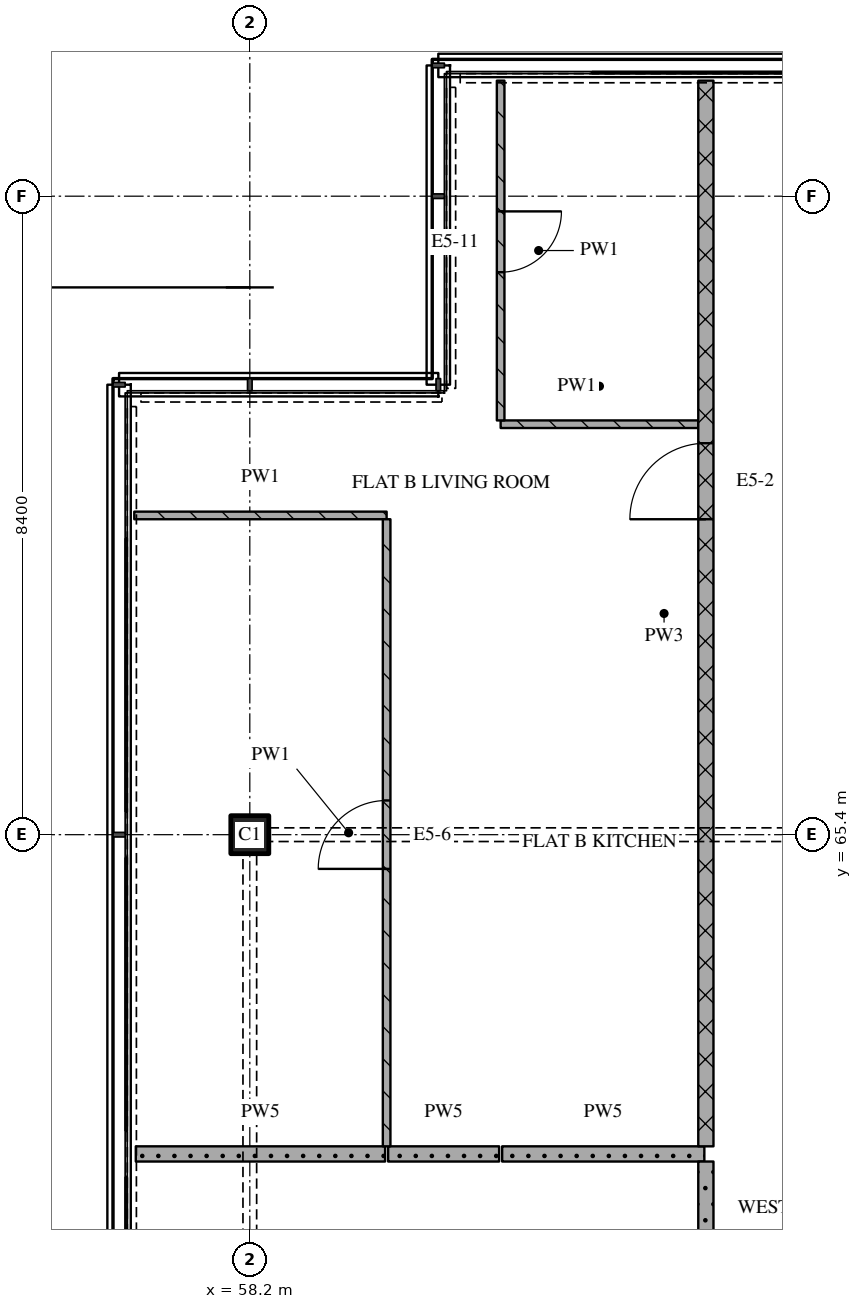
"""IFC4 building model, lengths in metres.
Left out: names, types, materials, properties, quantities, classifications, styles, units other than length and angle.
Written with IfcOpenShell. Run it as: python <this file> out.ifc"""

import sys

from ifc_helpers import new_model, si_unit, direction, frame, frame_2d, origin, origin_2d, place, context, subcontext, project, spatial, rectangle, extrude, element, fill, save


model = new_model("IFC4")
c1 = context("Model", 3, precision=1e-05, world=origin(), true_north=direction((0.0, 1.0)))
c2 = subcontext(c1, "Body", "Model", "MODEL_VIEW")
j1 = project(units=[si_unit("LENGTHUNIT", "METRE"), si_unit("PLANEANGLEUNIT", "RADIAN")], contexts=[c1])
p1 = place(None, origin())
s1 = spatial("IfcSite", under=j1, at=p1, CompositionType="ELEMENT")
p2 = place(p1, origin())
s2 = spatial("IfcBuilding", under=s1, at=p2, CompositionType="ELEMENT")
p3 = place(p2, frame((0.0, 0.0, 292.35)))
s3 = spatial("IfcBuildingStorey", under=s2, at=p3, CompositionType="ELEMENT", Elevation=292.35)
p4 = place(p3, frame((58.2, 65.4, 0.0), z_axis=(0.0, 0.0, 1.0), x_axis=(1.0, 0.0, 0.0)))
e1 = element("IfcColumn", 1, at=p4, inside=s3, PredefinedType="COLUMN", context=c2, shape_type="SweptSolid", body=[
    extrude(rectangle(XDim=0.5, YDim=0.5, at=origin_2d()), origin(), (0.0, 0.0, 1.0), 3.6),
])
p5 = place(p3, frame((56.7, 61.2, 0.0), z_axis=(0.0, 0.0, 1.0), x_axis=(1.0, 0.0, 0.0)))
e2 = element("IfcWall", 2, at=p5, inside=s3, PredefinedType="PARTITIONING", context=c2, shape_type="SweptSolid", body=[
    extrude(rectangle(XDim=3.28, YDim=0.2, at=frame_2d((1.64, 0.0))), origin(), (0.0, 0.0, 1.0), 3.32),
])
p6 = place(p3, frame((60.02, 61.2, 0.0), z_axis=(0.0, 0.0, 1.0), x_axis=(1.0, 0.0, 0.0)))
e3 = element("IfcWall", 3, at=p6, inside=s3, PredefinedType="PARTITIONING", context=c2, shape_type="SweptSolid", body=[
    extrude(rectangle(XDim=1.46, YDim=0.2, at=frame_2d((0.73, 0.0))), origin(), (0.0, 0.0, 1.0), 3.32),
])
p7 = place(p3, frame((61.52, 61.2, 0.0), z_axis=(0.0, 0.0, 1.0), x_axis=(1.0, 0.0, 0.0)))
e4 = element("IfcWall", 4, at=p7, inside=s3, PredefinedType="PARTITIONING", context=c2, shape_type="SweptSolid", body=[
    extrude(rectangle(XDim=2.66, YDim=0.2, at=frame_2d((1.33, 0.0))), origin(), (0.0, 0.0, 1.0), 3.32),
])
p8 = place(p3, frame((56.68, 69.6, 0.0), z_axis=(0.0, 0.0, 1.0), x_axis=(1.0, 0.0, 0.0)))
e5 = element("IfcWall", 5, at=p8, inside=s3, PredefinedType="PARTITIONING", context=c2, shape_type="SweptSolid", body=[
    extrude(rectangle(XDim=3.32, YDim=0.1, at=frame_2d((1.66, 0.0))), origin(), (0.0, 0.0, 1.0), 3.32),
])
p9 = place(p3, frame((61.5, 70.8, 0.0), z_axis=(0.0, 0.0, 1.0), x_axis=(1.0, 0.0, 0.0)))
e6 = element("IfcWall", 6, at=p9, inside=s3, PredefinedType="PARTITIONING", context=c2, shape_type="SweptSolid", body=[
    extrude(rectangle(XDim=2.6, YDim=0.1, at=frame_2d((1.3, 0.0))), origin(), (0.0, 0.0, 1.0), 3.32),
])
p10 = place(p3, frame((60.0, 61.3, 0.0), z_axis=(0.0, 0.0, 1.0), x_axis=(0.0, 1.0, 0.0)))
e7 = element("IfcWall", 7, at=p10, inside=s3, PredefinedType="PARTITIONING", context=c2, shape_type="SweptSolid", body=[
    extrude(rectangle(XDim=8.25, YDim=0.1, at=frame_2d((4.125, 0.0))), origin(), (0.0, 0.0, 1.0), 3.32),
])
p11 = place(p10, frame((3.65, 0.0, 0.0)))
e8 = element("IfcOpeningElement", 8, at=p11, cuts=e7, PredefinedType="OPENING", context=c2, shape_type="SweptSolid", body=[
    extrude(rectangle(XDim=0.9, YDim=2.1, at=frame_2d((0.45, 1.05))), frame((0.0, 0.06, 0.0), z_axis=(0.0, -1.0, 0.0), x_axis=(1.0, 0.0, 0.0)), (0.0, 0.0, 1.0), 0.12),
])
p12 = place(p3, frame((61.5, 75.32, 0.0), z_axis=(0.0, 0.0, 1.0), x_axis=(0.0, -1.0, 0.0)))
e9 = element("IfcWall", 9, at=p12, inside=s3, PredefinedType="PARTITIONING", context=c2, shape_type="SweptSolid", body=[
    extrude(rectangle(XDim=4.47, YDim=0.1, at=frame_2d((2.235, 0.0))), origin(), (0.0, 0.0, 1.0), 3.32),
])
p13 = place(p12, frame((1.72, 0.0, 0.0)))
e10 = element("IfcOpeningElement", 10, at=p13, cuts=e9, PredefinedType="OPENING", context=c2, shape_type="SweptSolid", body=[
    extrude(rectangle(XDim=0.8, YDim=2.1, at=frame_2d((0.4, 1.05))), frame((0.0, 0.06, 0.0), z_axis=(0.0, -1.0, 0.0), x_axis=(1.0, 0.0, 0.0)), (0.0, 0.0, 1.0), 0.12),
])
p14 = place(p3, frame((64.2, 61.3, 0.0), z_axis=(0.0, 0.0, 1.0), x_axis=(0.0, 1.0, 0.0)))
e11 = element("IfcWall", 11, at=p14, inside=s3, PredefinedType="PARTITIONING", context=c2, shape_type="SweptSolid", body=[
    extrude(rectangle(XDim=14.02, YDim=0.2, at=frame_2d((7.01, 0.0))), origin(), (0.0, 0.0, 1.0), 3.32),
])
p15 = place(p14, frame((8.25, 0.0, 0.0)))
e12 = element("IfcOpeningElement", 12, at=p15, cuts=e11, PredefinedType="OPENING", context=c2, shape_type="SweptSolid", body=[
    extrude(rectangle(XDim=1.0, YDim=2.1, at=frame_2d((0.5, 1.05))), frame((0.0, 0.11, 0.0), z_axis=(0.0, -1.0, 0.0), x_axis=(1.0, 0.0, 0.0)), (0.0, 0.0, 1.0), 0.22),
])
p16 = place(p3, frame((64.2, 61.1, 0.0), z_axis=(0.0, 0.0, 1.0), x_axis=(0.0, -1.0, 0.0)))
e13 = element("IfcWall", 13, at=p16, inside=s3, PredefinedType="PARTITIONING", context=c2, shape_type="SweptSolid", body=[
    extrude(rectangle(XDim=2.2, YDim=0.2, at=frame_2d((1.1, 0.0))), origin(), (0.0, 0.0, 1.0), 3.32),
])
p17 = place(p11, origin())
e14 = element("IfcDoor", 14, at=p17, inside=s3, OperationType="SINGLE_SWING_LEFT", PredefinedType="DOOR", context=c2, shape_type="SweptSolid", body=[
    extrude(rectangle(XDim=0.9, YDim=2.1, at=frame_2d((0.45, 1.05))), frame((0.0, 0.025, 0.0), z_axis=(0.0, -1.0, 0.0), x_axis=(1.0, 0.0, 0.0)), (0.0, 0.0, 1.0), 0.05),
])
fill(e8, e14)
p18 = place(p13, origin())
e15 = element("IfcDoor", 15, at=p18, inside=s3, OperationType="SINGLE_SWING_LEFT", PredefinedType="DOOR", context=c2, shape_type="SweptSolid", body=[
    extrude(rectangle(XDim=0.8, YDim=2.1, at=frame_2d((0.4, 1.05))), frame((0.0, 0.025, 0.0), z_axis=(0.0, -1.0, 0.0), x_axis=(1.0, 0.0, 0.0)), (0.0, 0.0, 1.0), 0.05),
])
fill(e10, e15)
p19 = place(p15, origin())
e16 = element("IfcDoor", 16, at=p19, inside=s3, OperationType="SINGLE_SWING_LEFT", PredefinedType="DOOR", context=c2, shape_type="SweptSolid", body=[
    extrude(rectangle(XDim=1.0, YDim=2.1, at=frame_2d((0.5, 1.05))), frame((0.0, 0.025, 0.0), z_axis=(0.0, -1.0, 0.0), x_axis=(1.0, 0.0, 0.0)), (0.0, 0.0, 1.0), 0.05),
])
fill(e12, e16)
save(model, sys.argv[1])
